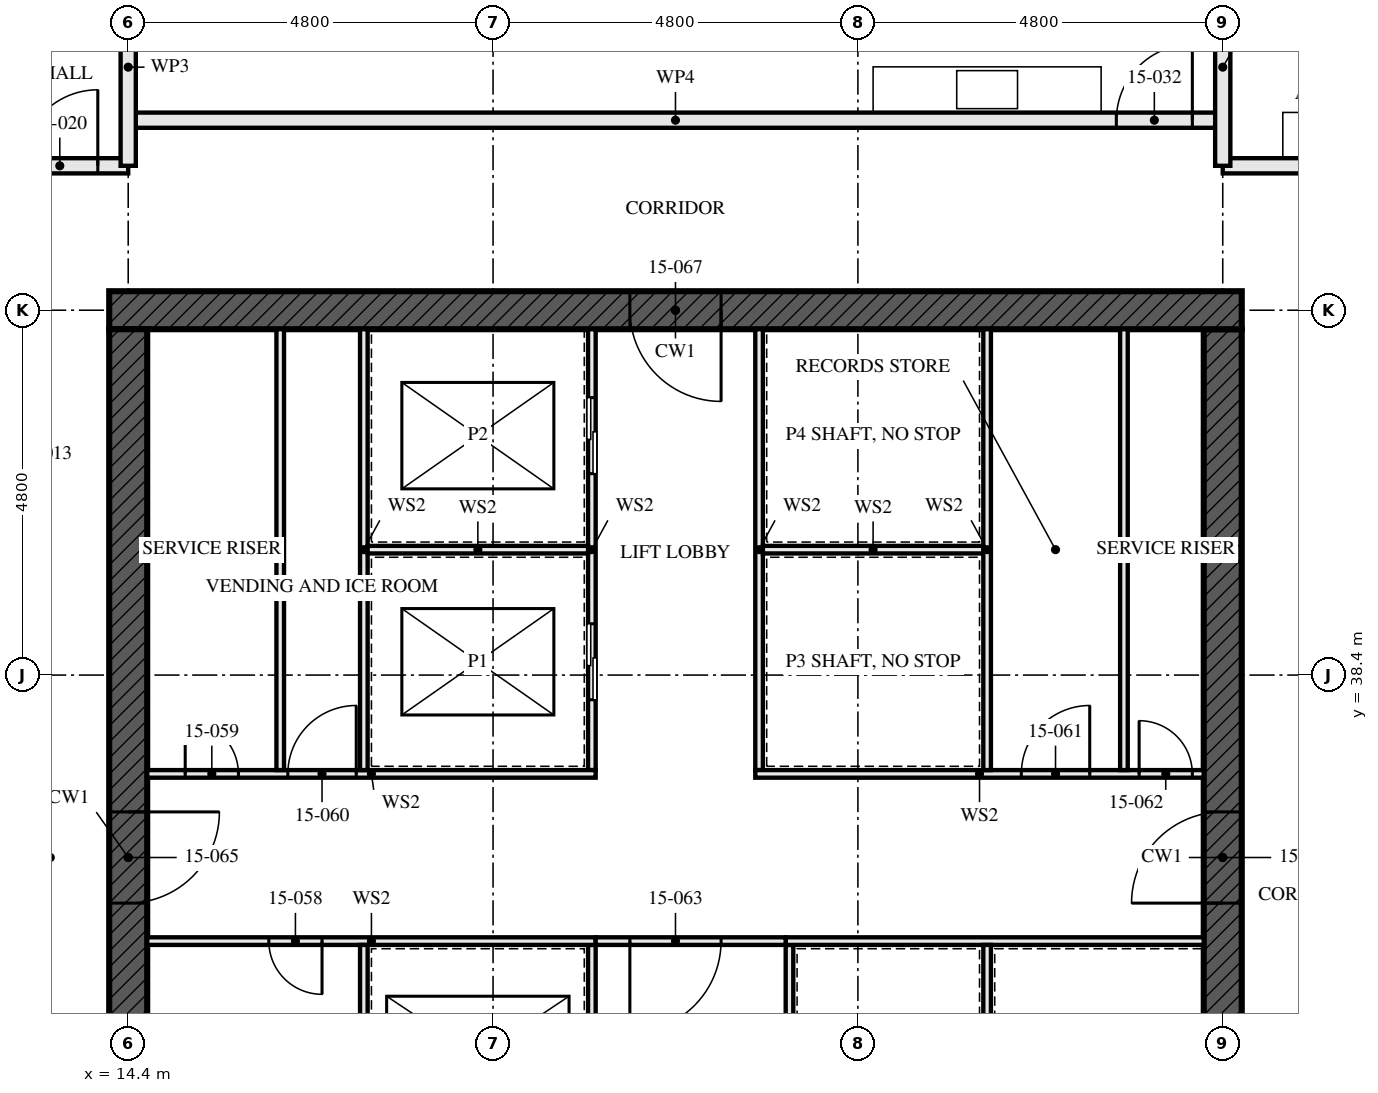
"""IFC4 building model, lengths in metres.
Left out: names, types, materials, properties, quantities, classifications, styles, units other than length and angle.
Written with IfcOpenShell. Run it as: python <this file> out.ifc"""

import sys

from ifc_helpers import new_model, si_unit, direction, frame, frame_2d, origin, place, context, subcontext, project, spatial, rectangle, extrude, element, fill, save


model = new_model("IFC4")
c1 = context("Model", 3, precision=1e-05, world=origin(), true_north=direction((0.0, 1.0)))
c2 = subcontext(c1, "Body", "Model", "MODEL_VIEW")
j1 = project(units=[si_unit("LENGTHUNIT", "METRE"), si_unit("PLANEANGLEUNIT", "RADIAN")], contexts=[c1])
p1 = place(None, origin())
s1 = spatial("IfcSite", under=j1, at=p1, CompositionType="ELEMENT")
p2 = place(p1, origin())
s2 = spatial("IfcBuilding", under=s1, at=p2, CompositionType="ELEMENT")
p3 = place(p2, frame((0.0, 0.0, 58.5)))
s3 = spatial("IfcBuildingStorey", under=s2, at=p3, CompositionType="ELEMENT", Elevation=58.5)
p4 = place(p3, frame((29.05, 43.2, -0.17), z_axis=(0.0, 0.0, 1.0), x_axis=(-1.0, 0.0, 0.0)))
e1 = element("IfcWall", 1, at=p4, inside=s3, PredefinedType="SHEAR", context=c2, shape_type="SweptSolid", body=[
    extrude(rectangle(XDim=14.9, YDim=0.5, at=frame_2d((7.45, 0.0))), origin(), (0.0, 0.0, 1.0), 3.5),
])
p5 = place(p4, frame((6.85, 0.0, 0.17)))
e2 = element("IfcOpeningElement", 2, at=p5, cuts=e1, PredefinedType="OPENING", context=c2, shape_type="SweptSolid", body=[
    extrude(rectangle(XDim=1.2, YDim=2.1, at=frame_2d((0.6, 1.05))), frame((0.0, 0.26, 0.0), z_axis=(0.0, -1.0, 0.0), x_axis=(1.0, 0.0, 0.0)), (0.0, 0.0, 1.0), 0.521),
])
p6 = place(p3, frame((14.4, 42.95, -0.17), z_axis=(0.0, 0.0, 1.0), x_axis=(0.0, -1.0, 0.0)))
e3 = element("IfcWall", 3, at=p6, inside=s3, PredefinedType="SHEAR", context=c2, shape_type="SweptSolid", body=[
    extrude(rectangle(XDim=13.9, YDim=0.5, at=frame_2d((6.95, 0.0))), origin(), (0.0, 0.0, 1.0), 3.5),
])
p7 = place(p6, frame((6.35, 0.0, 0.17)))
e4 = element("IfcOpeningElement", 4, at=p7, cuts=e3, PredefinedType="OPENING", context=c2, shape_type="SweptSolid", body=[
    extrude(rectangle(XDim=1.2, YDim=2.1, at=frame_2d((0.6, 1.05))), frame((0.0, 0.26, 0.0), z_axis=(0.0, -1.0, 0.0), x_axis=(1.0, 0.0, 0.0)), (0.0, 0.0, 1.0), 0.521),
])
p8 = place(p3, frame((28.8, 29.05, -0.17), z_axis=(0.0, 0.0, 1.0), x_axis=(0.0, 1.0, 0.0)))
e5 = element("IfcWall", 5, at=p8, inside=s3, PredefinedType="SHEAR", context=c2, shape_type="SweptSolid", body=[
    extrude(rectangle(XDim=13.9, YDim=0.5, at=frame_2d((6.95, 0.0))), origin(), (0.0, 0.0, 1.0), 3.5),
])
p9 = place(p8, frame((6.35, 0.0, 0.17)))
e6 = element("IfcOpeningElement", 6, at=p9, cuts=e5, PredefinedType="OPENING", context=c2, shape_type="SweptSolid", body=[
    extrude(rectangle(XDim=1.2, YDim=2.1, at=frame_2d((0.6, 1.05))), frame((0.0, 0.26, 0.0), z_axis=(0.0, -1.0, 0.0), x_axis=(1.0, 0.0, 0.0)), (0.0, 0.0, 1.0), 0.521),
])
p10 = place(p3, frame((14.4, 45.1, 0.0), z_axis=(0.0, 0.0, 1.0), x_axis=(-1.0, 0.0, 0.0)))
e7 = element("IfcWall", 7, at=p10, inside=s3, PredefinedType="PARTITIONING", context=c2, shape_type="SweptSolid", body=[
    extrude(rectangle(XDim=9.6, YDim=0.2, at=frame_2d((4.8, 0.0))), origin(), (0.0, 0.0, 1.0), 3.33),
])
p11 = place(p10, frame((0.4, 0.0, 0.0)))
e8 = element("IfcOpeningElement", 8, at=p11, cuts=e7, PredefinedType="OPENING", context=c2, shape_type="SweptSolid", body=[
    extrude(rectangle(XDim=1.0, YDim=2.1, at=frame_2d((0.5, 1.05))), frame((0.0, 0.111, 0.0), z_axis=(0.0, -1.0, 0.0), x_axis=(1.0, 0.0, 0.0)), (0.0, 0.0, 1.0), 0.221),
])
p12 = place(p3, frame((28.8, 45.7, 0.0), z_axis=(0.0, 0.0, 1.0), x_axis=(-1.0, 0.0, 0.0)))
e9 = element("IfcWall", 9, at=p12, inside=s3, PredefinedType="PARTITIONING", context=c2, shape_type="SweptSolid", body=[
    extrude(rectangle(XDim=14.4, YDim=0.2, at=frame_2d((7.2, 0.0))), origin(), (0.0, 0.0, 1.0), 3.33),
])
p13 = place(p12, frame((0.4, 0.0, 0.0)))
e10 = element("IfcOpeningElement", 10, at=p13, cuts=e9, PredefinedType="OPENING", context=c2, shape_type="SweptSolid", body=[
    extrude(rectangle(XDim=1.0, YDim=2.1, at=frame_2d((0.5, 1.05))), frame((0.0, 0.111, 0.0), z_axis=(0.0, -1.0, 0.0), x_axis=(1.0, 0.0, 0.0)), (0.0, 0.0, 1.0), 0.221),
])
p14 = place(p3, frame((38.4, 45.1, 0.0), z_axis=(0.0, 0.0, 1.0), x_axis=(-1.0, 0.0, 0.0)))
e11 = element("IfcWall", 11, at=p14, inside=s3, PredefinedType="PARTITIONING", context=c2, shape_type="SweptSolid", body=[
    extrude(rectangle(XDim=9.6, YDim=0.2, at=frame_2d((4.8, 0.0))), origin(), (0.0, 0.0, 1.0), 3.33),
])
p15 = place(p14, frame((0.4, 0.0, 0.0)))
e12 = element("IfcOpeningElement", 12, at=p15, cuts=e11, PredefinedType="OPENING", context=c2, shape_type="SweptSolid", body=[
    extrude(rectangle(XDim=1.0, YDim=2.1, at=frame_2d((0.5, 1.05))), frame((0.0, 0.111, 0.0), z_axis=(0.0, -1.0, 0.0), x_axis=(1.0, 0.0, 0.0)), (0.0, 0.0, 1.0), 0.221),
])
for number, where, z_axis, x_axis in (
    (13, (16.4, 37.15, 0.0), (0.0, 0.0, 1.0), (0.0, 1.0, 0.0)),
    (14, (27.5, 37.15, 0.0), (0.0, 0.0, 1.0), (0.0, 1.0, 0.0)),
):
    element("IfcWall", number, at=place(p3, frame(where, z_axis=z_axis, x_axis=x_axis)), inside=s3, PredefinedType="SOLIDWALL", context=c2, shape_type="SweptSolid", body=[
        extrude(rectangle(XDim=5.8, YDim=0.1, at=frame_2d((2.9, 0.0))), origin(), (0.0, 0.0, 1.0), 3.33),
    ])
p16 = place(p3, frame((20.5, 29.05, 0.0), z_axis=(0.0, 0.0, 1.0), x_axis=(0.0, 1.0, 0.0)))
e15 = element("IfcWall", 15, at=p16, inside=s3, PredefinedType="SOLIDWALL", context=c2, shape_type="SweptSolid", body=[
    extrude(rectangle(XDim=5.8, YDim=0.1, at=frame_2d((2.9, 0.0))), origin(), (0.0, 0.0, 1.0), 3.33),
])
p17 = place(p16, frame((0.8, 0.0, 0.0)))
e16 = element("IfcOpeningElement", 16, at=p17, cuts=e15, PredefinedType="OPENING", context=c2, shape_type="SweptSolid", body=[
    extrude(rectangle(XDim=1.1, YDim=2.3, at=frame_2d((0.55, 1.15))), frame((0.0, 0.061, 0.0), z_axis=(0.0, -1.0, 0.0), x_axis=(1.0, 0.0, 0.0)), (0.0, 0.0, 1.0), 0.121),
])
p18 = place(p16, frame((3.775, 0.0, 0.0)))
e17 = element("IfcOpeningElement", 17, at=p18, cuts=e15, PredefinedType="OPENING", context=c2, shape_type="SweptSolid", body=[
    extrude(rectangle(XDim=1.1, YDim=2.3, at=frame_2d((0.55, 1.15))), frame((0.0, 0.061, 0.0), z_axis=(0.0, -1.0, 0.0), x_axis=(1.0, 0.0, 0.0)), (0.0, 0.0, 1.0), 0.121),
])
p19 = place(p3, frame((20.5, 37.15, 0.0), z_axis=(0.0, 0.0, 1.0), x_axis=(0.0, 1.0, 0.0)))
e18 = element("IfcWall", 18, at=p19, inside=s3, PredefinedType="SOLIDWALL", context=c2, shape_type="SweptSolid", body=[
    extrude(rectangle(XDim=5.8, YDim=0.1, at=frame_2d((2.9, 0.0))), origin(), (0.0, 0.0, 1.0), 3.33),
])
p20 = place(p19, frame((0.925, 0.0, 0.0)))
e19 = element("IfcOpeningElement", 19, at=p20, cuts=e18, PredefinedType="OPENING", context=c2, shape_type="SweptSolid", body=[
    extrude(rectangle(XDim=1.0, YDim=2.1, at=frame_2d((0.5, 1.05))), frame((0.0, 0.061, 0.0), z_axis=(0.0, -1.0, 0.0), x_axis=(1.0, 0.0, 0.0)), (0.0, 0.0, 1.0), 0.121),
])
p21 = place(p19, frame((3.9, 0.0, 0.0)))
e20 = element("IfcOpeningElement", 20, at=p21, cuts=e18, PredefinedType="OPENING", context=c2, shape_type="SweptSolid", body=[
    extrude(rectangle(XDim=1.0, YDim=2.1, at=frame_2d((0.5, 1.05))), frame((0.0, 0.061, 0.0), z_axis=(0.0, -1.0, 0.0), x_axis=(1.0, 0.0, 0.0)), (0.0, 0.0, 1.0), 0.121),
])
p22 = place(p3, frame((22.7, 37.15, 0.0), z_axis=(0.0, 0.0, 1.0), x_axis=(0.0, 1.0, 0.0)))
e21 = element("IfcWall", 21, at=p22, inside=s3, PredefinedType="SOLIDWALL", context=c2, shape_type="SweptSolid", body=[
    extrude(rectangle(XDim=5.8, YDim=0.1, at=frame_2d((2.9, 0.0))), origin(), (0.0, 0.0, 1.0), 3.33),
])
p23 = place(p3, frame((23.1, 29.05, 0.0), z_axis=(0.0, 0.0, 1.0), x_axis=(0.0, 1.0, 0.0)))
e22 = element("IfcWall", 22, at=p23, inside=s3, PredefinedType="SOLIDWALL", context=c2, shape_type="SweptSolid", body=[
    extrude(rectangle(XDim=5.8, YDim=0.1, at=frame_2d((2.9, 0.0))), origin(), (0.0, 0.0, 1.0), 3.33),
])
p24 = place(p23, frame((1.0, 0.0, 0.0)))
e23 = element("IfcOpeningElement", 23, at=p24, cuts=e22, PredefinedType="OPENING", context=c2, shape_type="SweptSolid", body=[
    extrude(rectangle(XDim=0.7, YDim=2.1, at=frame_2d((0.35, 1.05))), frame((0.0, 0.061, 0.0), z_axis=(0.0, -1.0, 0.0), x_axis=(1.0, 0.0, 0.0)), (0.0, 0.0, 1.0), 0.121),
])
p25 = place(p3, frame((14.65, 34.9, 0.0), z_axis=(0.0, 0.0, 1.0), x_axis=(1.0, 0.0, 0.0)))
e24 = element("IfcWall", 24, at=p25, inside=s3, PredefinedType="SOLIDWALL", context=c2, shape_type="SweptSolid", body=[
    extrude(rectangle(XDim=5.9, YDim=0.1, at=frame_2d((2.95, 0.0))), origin(), (0.0, 0.0, 1.0), 3.33),
])
p26 = place(p25, frame((1.6, 0.0, 0.0)))
e25 = element("IfcOpeningElement", 25, at=p26, cuts=e24, PredefinedType="OPENING", context=c2, shape_type="SweptSolid", body=[
    extrude(rectangle(XDim=0.7, YDim=2.1, at=frame_2d((0.35, 1.05))), frame((0.0, 0.061, 0.0), z_axis=(0.0, -1.0, 0.0), x_axis=(1.0, 0.0, 0.0)), (0.0, 0.0, 1.0), 0.121),
])
p27 = place(p3, frame((23.05, 34.9, 0.0), z_axis=(0.0, 0.0, 1.0), x_axis=(1.0, 0.0, 0.0)))
e26 = element("IfcWall", 26, at=p27, inside=s3, PredefinedType="SOLIDWALL", context=c2, shape_type="SweptSolid", body=[
    extrude(rectangle(XDim=5.5, YDim=0.1, at=frame_2d((2.75, 0.0))), origin(), (0.0, 0.0, 1.0), 3.33),
])
p28 = place(p3, frame((14.65, 37.1, 0.0), z_axis=(0.0, 0.0, 1.0), x_axis=(1.0, 0.0, 0.0)))
e27 = element("IfcWall", 27, at=p28, inside=s3, PredefinedType="SOLIDWALL", context=c2, shape_type="SweptSolid", body=[
    extrude(rectangle(XDim=5.9, YDim=0.1, at=frame_2d((2.95, 0.0))), origin(), (0.0, 0.0, 1.0), 3.33),
])
p29 = place(p28, frame((0.5, 0.0, 0.0)))
e28 = element("IfcOpeningElement", 28, at=p29, cuts=e27, PredefinedType="OPENING", context=c2, shape_type="SweptSolid", body=[
    extrude(rectangle(XDim=0.7, YDim=2.1, at=frame_2d((0.35, 1.05))), frame((0.0, 0.061, 0.0), z_axis=(0.0, -1.0, 0.0), x_axis=(1.0, 0.0, 0.0)), (0.0, 0.0, 1.0), 0.121),
])
p30 = place(p28, frame((1.85, 0.0, 0.0)))
e29 = element("IfcOpeningElement", 29, at=p30, cuts=e27, PredefinedType="OPENING", context=c2, shape_type="SweptSolid", body=[
    extrude(rectangle(XDim=0.9, YDim=2.1, at=frame_2d((0.45, 1.05))), frame((0.0, 0.061, 0.0), z_axis=(0.0, -1.0, 0.0), x_axis=(1.0, 0.0, 0.0)), (0.0, 0.0, 1.0), 0.121),
])
p31 = place(p3, frame((22.65, 37.1, 0.0), z_axis=(0.0, 0.0, 1.0), x_axis=(1.0, 0.0, 0.0)))
e30 = element("IfcWall", 30, at=p31, inside=s3, PredefinedType="SOLIDWALL", context=c2, shape_type="SweptSolid", body=[
    extrude(rectangle(XDim=5.9, YDim=0.1, at=frame_2d((2.95, 0.0))), origin(), (0.0, 0.0, 1.0), 3.33),
])
p32 = place(p31, frame((3.5, 0.0, 0.0)))
e31 = element("IfcOpeningElement", 31, at=p32, cuts=e30, PredefinedType="OPENING", context=c2, shape_type="SweptSolid", body=[
    extrude(rectangle(XDim=0.9, YDim=2.1, at=frame_2d((0.45, 1.05))), frame((0.0, 0.061, 0.0), z_axis=(0.0, -1.0, 0.0), x_axis=(1.0, 0.0, 0.0)), (0.0, 0.0, 1.0), 0.121),
])
p33 = place(p31, frame((5.05, 0.0, 0.0)))
e32 = element("IfcOpeningElement", 32, at=p33, cuts=e30, PredefinedType="OPENING", context=c2, shape_type="SweptSolid", body=[
    extrude(rectangle(XDim=0.7, YDim=2.1, at=frame_2d((0.35, 1.05))), frame((0.0, 0.061, 0.0), z_axis=(0.0, -1.0, 0.0), x_axis=(1.0, 0.0, 0.0)), (0.0, 0.0, 1.0), 0.121),
])
p34 = place(p3, frame((20.55, 34.9, 0.0), z_axis=(0.0, 0.0, 1.0), x_axis=(1.0, 0.0, 0.0)))
e33 = element("IfcWall", 33, at=p34, inside=s3, PredefinedType="SOLIDWALL", context=c2, shape_type="SweptSolid", body=[
    extrude(rectangle(XDim=2.5, YDim=0.1, at=frame_2d((1.25, 0.0))), origin(), (0.0, 0.0, 1.0), 3.33),
])
p35 = place(p34, frame((0.45, 0.0, 0.0)))
e34 = element("IfcOpeningElement", 34, at=p35, cuts=e33, PredefinedType="OPENING", context=c2, shape_type="SweptSolid", body=[
    extrude(rectangle(XDim=1.2, YDim=2.1, at=frame_2d((0.6, 1.05))), frame((0.0, 0.061, 0.0), z_axis=(0.0, -1.0, 0.0), x_axis=(1.0, 0.0, 0.0)), (0.0, 0.0, 1.0), 0.121),
])
for number, where, z_axis, x_axis in (
    (35, (17.5, 29.05, 0.0), (0.0, 0.0, 1.0), (0.0, 1.0, 0.0)),
    (36, (17.5, 37.15, 0.0), (0.0, 0.0, 1.0), (0.0, 1.0, 0.0)),
):
    element("IfcWall", number, at=place(p3, frame(where, z_axis=z_axis, x_axis=x_axis)), inside=s3, PredefinedType="SOLIDWALL", context=c2, shape_type="SweptSolid", body=[
        extrude(rectangle(XDim=5.8, YDim=0.1, at=frame_2d((2.9, 0.0))), origin(), (0.0, 0.0, 1.0), 3.33),
    ])
for number, where, z_axis, x_axis in (
    (37, (17.55, 40.05, 0.0), (0.0, 0.0, 1.0), (1.0, 0.0, 0.0)),
    (38, (22.75, 40.05, 0.0), (0.0, 0.0, 1.0), (1.0, 0.0, 0.0)),
):
    element("IfcWall", number, at=place(p3, frame(where, z_axis=z_axis, x_axis=x_axis)), inside=s3, PredefinedType="SOLIDWALL", context=c2, shape_type="SweptSolid", body=[
        extrude(rectangle(XDim=2.9, YDim=0.1, at=frame_2d((1.45, 0.0))), origin(), (0.0, 0.0, 1.0), 3.33),
    ])
p36 = place(p3, frame((25.7, 37.15, 0.0), z_axis=(0.0, 0.0, 1.0), x_axis=(0.0, 1.0, 0.0)))
e39 = element("IfcWall", 39, at=p36, inside=s3, PredefinedType="SOLIDWALL", context=c2, shape_type="SweptSolid", body=[
    extrude(rectangle(XDim=5.8, YDim=0.1, at=frame_2d((2.9, 0.0))), origin(), (0.0, 0.0, 1.0), 3.33),
])
p37 = place(p3, frame((25.7, 31.95, 0.0), z_axis=(0.0, 0.0, 1.0), x_axis=(0.0, 1.0, 0.0)))
e40 = element("IfcWall", 40, at=p37, inside=s3, PredefinedType="SOLIDWALL", context=c2, shape_type="SweptSolid", body=[
    extrude(rectangle(XDim=2.9, YDim=0.1, at=frame_2d((1.45, 0.0))), origin(), (0.0, 0.0, 1.0), 3.33),
])
for number, where, z_axis, x_axis in (
    (41, (14.4, 45.1, 0.0), (0.0, 0.0, 1.0), (0.0, 1.0, 0.0)),
    (42, (28.8, 45.1, 0.0), (0.0, 0.0, 1.0), (0.0, 1.0, 0.0)),
):
    element("IfcWall", number, at=place(p3, frame(where, z_axis=z_axis, x_axis=x_axis)), inside=s3, PredefinedType="PARTITIONING", context=c2, shape_type="SweptSolid", body=[
        extrude(rectangle(XDim=2.595, YDim=0.2, at=frame_2d((1.298, 0.0))), origin(), (0.0, 0.0, 1.0), 2.32),
    ])
p38 = place(p11, frame((1.0, 0.0, 0.0), z_axis=(0.0, 0.0, 1.0), x_axis=(-1.0, 0.0, 0.0)))
e43 = element("IfcDoor", 43, at=p38, inside=s3, OperationType="SINGLE_SWING_LEFT", PredefinedType="DOOR", context=c2, shape_type="SweptSolid", body=[
    extrude(rectangle(XDim=1.0, YDim=2.1, at=frame_2d((0.5, 1.05))), frame((0.0, 0.027, 0.0), z_axis=(0.0, -1.0, 0.0), x_axis=(1.0, 0.0, 0.0)), (0.0, 0.0, 1.0), 0.054),
])
fill(e8, e43)
p39 = place(p13, frame((1.0, 0.0, 0.0), z_axis=(0.0, 0.0, 1.0), x_axis=(-1.0, 0.0, 0.0)))
e44 = element("IfcDoor", 44, at=p39, inside=s3, OperationType="SINGLE_SWING_LEFT", PredefinedType="DOOR", context=c2, shape_type="SweptSolid", body=[
    extrude(rectangle(XDim=1.0, YDim=2.1, at=frame_2d((0.5, 1.05))), frame((0.0, 0.027, 0.0), z_axis=(0.0, -1.0, 0.0), x_axis=(1.0, 0.0, 0.0)), (0.0, 0.0, 1.0), 0.054),
])
fill(e10, e44)
p40 = place(p20, origin())
e45 = element("IfcDoor", 45, at=p40, inside=s3, OperationType="SLIDING_TO_LEFT", PredefinedType="DOOR", context=c2, shape_type="SweptSolid", body=[
    extrude(rectangle(XDim=1.0, YDim=2.1, at=frame_2d((0.5, 1.05))), frame((0.0, 0.05, 0.0), z_axis=(0.0, -1.0, 0.0), x_axis=(1.0, 0.0, 0.0)), (0.0, 0.0, 1.0), 0.1),
])
fill(e19, e45)
p41 = place(p21, origin())
e46 = element("IfcDoor", 46, at=p41, inside=s3, OperationType="SLIDING_TO_LEFT", PredefinedType="DOOR", context=c2, shape_type="SweptSolid", body=[
    extrude(rectangle(XDim=1.0, YDim=2.1, at=frame_2d((0.5, 1.05))), frame((0.0, 0.05, 0.0), z_axis=(0.0, -1.0, 0.0), x_axis=(1.0, 0.0, 0.0)), (0.0, 0.0, 1.0), 0.1),
])
fill(e20, e46)
p42 = place(p26, frame((0.7, 0.0, 0.0), z_axis=(0.0, 0.0, 1.0), x_axis=(-1.0, 0.0, 0.0)))
e47 = element("IfcDoor", 47, at=p42, inside=s3, OperationType="SINGLE_SWING_RIGHT", PredefinedType="DOOR", context=c2, shape_type="SweptSolid", body=[
    extrude(rectangle(XDim=0.7, YDim=2.1, at=frame_2d((0.35, 1.05))), frame((0.0, 0.027, 0.0), z_axis=(0.0, -1.0, 0.0), x_axis=(1.0, 0.0, 0.0)), (0.0, 0.0, 1.0), 0.054),
])
fill(e25, e47)
p43 = place(p29, origin())
e48 = element("IfcDoor", 48, at=p43, inside=s3, OperationType="SINGLE_SWING_RIGHT", PredefinedType="DOOR", context=c2, shape_type="SweptSolid", body=[
    extrude(rectangle(XDim=0.7, YDim=2.1, at=frame_2d((0.35, 1.05))), frame((0.0, 0.027, 0.0), z_axis=(0.0, -1.0, 0.0), x_axis=(1.0, 0.0, 0.0)), (0.0, 0.0, 1.0), 0.054),
])
fill(e28, e48)
p44 = place(p30, origin())
e49 = element("IfcDoor", 49, at=p44, inside=s3, OperationType="SINGLE_SWING_LEFT", PredefinedType="DOOR", context=c2, shape_type="SweptSolid", body=[
    extrude(rectangle(XDim=0.9, YDim=2.1, at=frame_2d((0.45, 1.05))), frame((0.0, 0.027, 0.0), z_axis=(0.0, -1.0, 0.0), x_axis=(1.0, 0.0, 0.0)), (0.0, 0.0, 1.0), 0.054),
])
fill(e29, e49)
p45 = place(p32, origin())
e50 = element("IfcDoor", 50, at=p45, inside=s3, OperationType="SINGLE_SWING_LEFT", PredefinedType="DOOR", context=c2, shape_type="SweptSolid", body=[
    extrude(rectangle(XDim=0.9, YDim=2.1, at=frame_2d((0.45, 1.05))), frame((0.0, 0.027, 0.0), z_axis=(0.0, -1.0, 0.0), x_axis=(1.0, 0.0, 0.0)), (0.0, 0.0, 1.0), 0.054),
])
fill(e31, e50)
p46 = place(p33, origin())
e51 = element("IfcDoor", 51, at=p46, inside=s3, OperationType="SINGLE_SWING_RIGHT", PredefinedType="DOOR", context=c2, shape_type="SweptSolid", body=[
    extrude(rectangle(XDim=0.7, YDim=2.1, at=frame_2d((0.35, 1.05))), frame((0.0, 0.027, 0.0), z_axis=(0.0, -1.0, 0.0), x_axis=(1.0, 0.0, 0.0)), (0.0, 0.0, 1.0), 0.054),
])
fill(e32, e51)
p47 = place(p35, frame((1.2, 0.0, 0.0), z_axis=(0.0, 0.0, 1.0), x_axis=(-1.0, 0.0, 0.0)))
e52 = element("IfcDoor", 52, at=p47, inside=s3, OperationType="SINGLE_SWING_LEFT", PredefinedType="DOOR", context=c2, shape_type="SweptSolid", body=[
    extrude(rectangle(XDim=1.2, YDim=2.1, at=frame_2d((0.6, 1.05))), frame((0.0, 0.027, 0.0), z_axis=(0.0, -1.0, 0.0), x_axis=(1.0, 0.0, 0.0)), (0.0, 0.0, 1.0), 0.054),
])
fill(e34, e52)
p48 = place(p7, origin())
e53 = element("IfcDoor", 53, at=p48, inside=s3, OperationType="SINGLE_SWING_LEFT", PredefinedType="DOOR", context=c2, shape_type="SweptSolid", body=[
    extrude(rectangle(XDim=1.2, YDim=2.1, at=frame_2d((0.6, 1.05))), frame((0.0, 0.027, 0.0), z_axis=(0.0, -1.0, 0.0), x_axis=(1.0, 0.0, 0.0)), (0.0, 0.0, 1.0), 0.054),
])
fill(e4, e53)
p49 = place(p9, origin())
e54 = element("IfcDoor", 54, at=p49, inside=s3, OperationType="SINGLE_SWING_LEFT", PredefinedType="DOOR", context=c2, shape_type="SweptSolid", body=[
    extrude(rectangle(XDim=1.2, YDim=2.1, at=frame_2d((0.6, 1.05))), frame((0.0, 0.027, 0.0), z_axis=(0.0, -1.0, 0.0), x_axis=(1.0, 0.0, 0.0)), (0.0, 0.0, 1.0), 0.054),
])
fill(e6, e54)
p50 = place(p5, origin())
e55 = element("IfcDoor", 55, at=p50, inside=s3, OperationType="SINGLE_SWING_LEFT", PredefinedType="DOOR", context=c2, shape_type="SweptSolid", body=[
    extrude(rectangle(XDim=1.2, YDim=2.1, at=frame_2d((0.6, 1.05))), frame((0.0, 0.027, 0.0), z_axis=(0.0, -1.0, 0.0), x_axis=(1.0, 0.0, 0.0)), (0.0, 0.0, 1.0), 0.054),
])
fill(e2, e55)
save(model, sys.argv[1])
